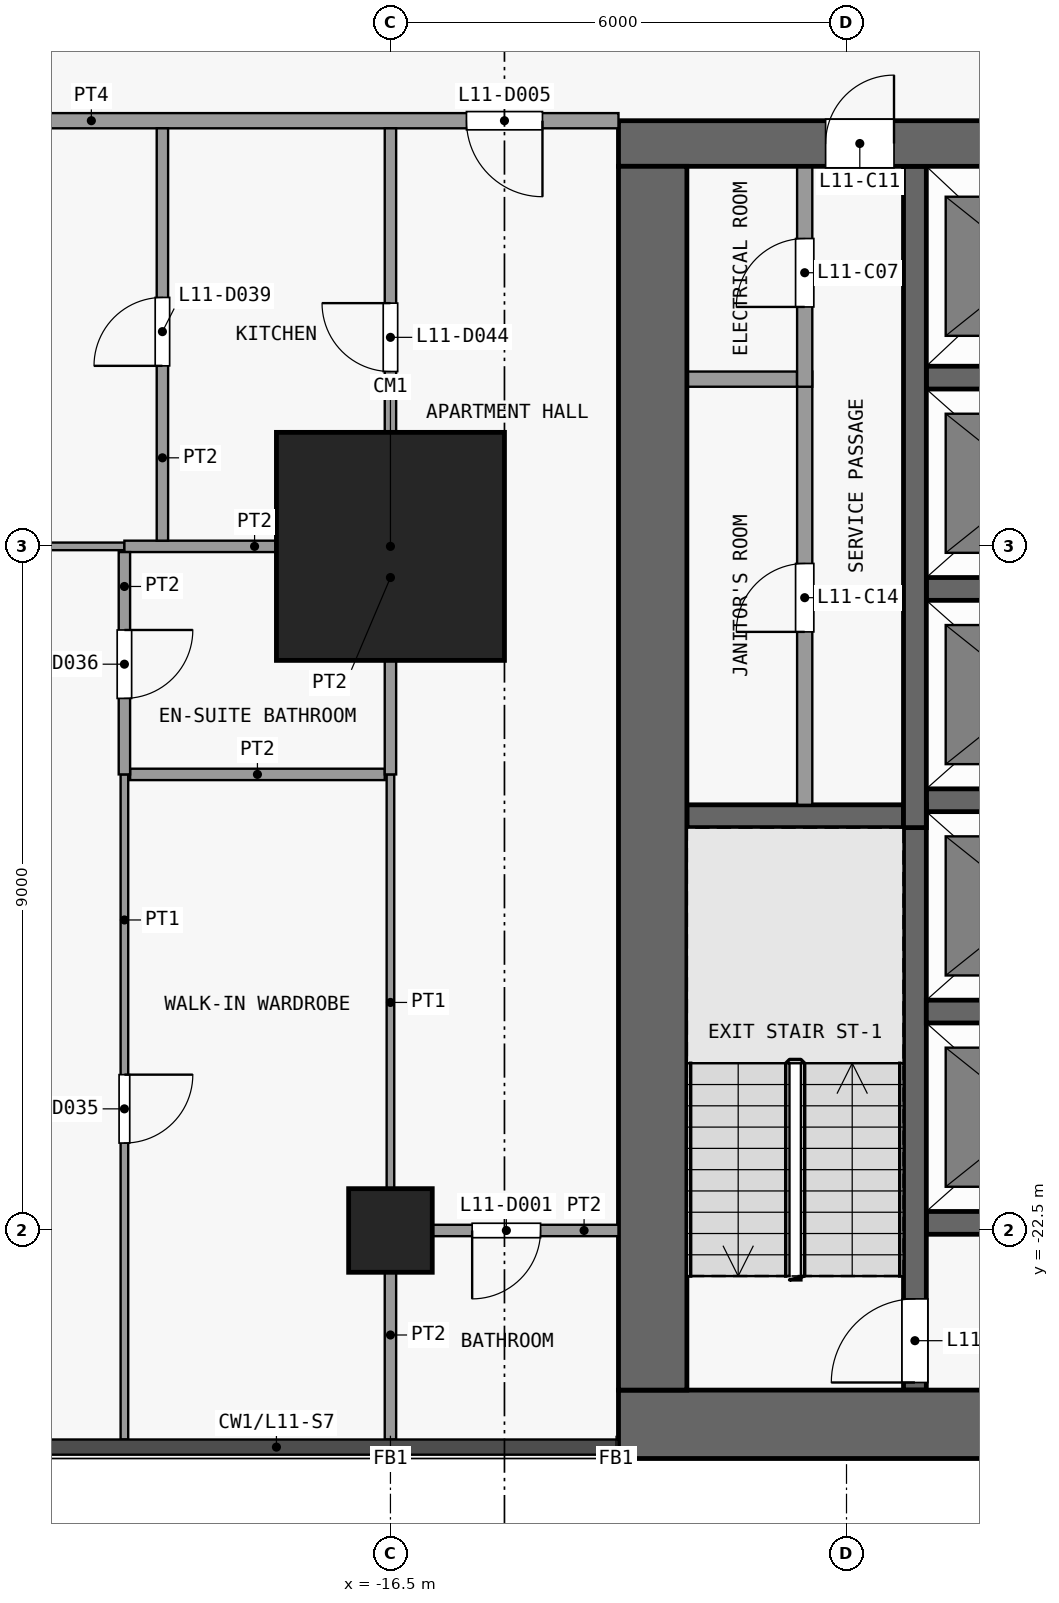
"""IFC4 building model, lengths in metres.
Left out: names, types, materials, properties, quantities, classifications, styles, units other than length and angle.
Written with IfcOpenShell. Run it as: python <this file> out.ifc"""

import sys

from ifc_helpers import new_model, si_unit, direction, frame, frame_2d, origin, origin_2d, place, context, subcontext, project, spatial, rectangle, extrude, element, fill, save


model = new_model("IFC4")
c1 = context("Model", 3, precision=1e-05, world=origin(), true_north=direction((0.0, 1.0)))
c2 = subcontext(c1, "Body", "Model", "MODEL_VIEW")
j1 = project(units=[si_unit("LENGTHUNIT", "METRE"), si_unit("PLANEANGLEUNIT", "RADIAN")], contexts=[c1])
p1 = place(None, origin())
s1 = spatial("IfcSite", under=j1, at=p1, CompositionType="ELEMENT")
p2 = place(p1, origin())
s2 = spatial("IfcBuilding", under=s1, at=p2, CompositionType="ELEMENT")
p3 = place(p2, frame((0.0, 0.0, 50.5)))
s3 = spatial("IfcBuildingStorey", under=s2, at=p3, CompositionType="ELEMENT", Elevation=50.5)
p4 = place(p3, frame((-16.5, -22.5, 0.0), z_axis=(0.0, 0.0, 1.0), x_axis=(1.0, 0.0, 0.0)))
e1 = element("IfcColumn", 1, at=p4, inside=s3, PredefinedType="COLUMN", context=c2, shape_type="SweptSolid", body=[
    extrude(rectangle(XDim=1.1, YDim=1.1, at=origin_2d()), origin(), (0.0, 0.0, 1.0), 3.6),
])
p5 = place(p3, frame((-16.5, -13.5, 0.0), z_axis=(0.0, 0.0, 1.0), x_axis=(1.0, 0.0, 0.0)))
e2 = element("IfcColumn", 2, at=p5, inside=s3, PredefinedType="COLUMN", context=c2, shape_type="SweptSolid", body=[
    extrude(rectangle(XDim=3.0, YDim=3.0, at=origin_2d()), origin(), (0.0, 0.0, 1.0), 3.6),
])
p6 = place(p3, frame((-13.5, -25.05, 0.0), z_axis=(0.0, 0.0, 1.0), x_axis=(1.0, 0.0, 0.0)))
e3 = element("IfcWall", 3, at=p6, inside=s3, PredefinedType="SHEAR", context=c2, shape_type="SweptSolid", body=[
    extrude(rectangle(XDim=27.0, YDim=0.9, at=frame_2d((13.5, 0.0))), origin(), (0.0, 0.0, 1.0), 3.3),
])
p7 = place(p3, frame((-13.5, -8.2, 0.0), z_axis=(0.0, 0.0, 1.0), x_axis=(1.0, 0.0, 0.0)))
e4 = element("IfcWall", 4, at=p7, inside=s3, PredefinedType="SHEAR", context=c2, shape_type="SweptSolid", body=[
    extrude(rectangle(XDim=27.0, YDim=0.6, at=frame_2d((13.5, 0.0))), origin(), (0.0, 0.0, 1.0), 3.3),
])
p8 = place(p7, frame((7.8, 0.0, 0.0)))
e5 = element("IfcOpeningElement", 5, at=p8, cuts=e4, PredefinedType="OPENING", context=c2, shape_type="SweptSolid", body=[
    extrude(rectangle(XDim=1.8, YDim=2.1, at=frame_2d((0.9, 1.05))), frame((0.0, 0.31, 0.0), z_axis=(0.0, -1.0, 0.0), x_axis=(1.0, 0.0, 0.0)), (0.0, 0.0, 1.0), 0.62),
])
p9 = place(p7, frame((17.4, 0.0, 0.0)))
e6 = element("IfcOpeningElement", 6, at=p9, cuts=e4, PredefinedType="OPENING", context=c2, shape_type="SweptSolid", body=[
    extrude(rectangle(XDim=1.8, YDim=2.1, at=frame_2d((0.9, 1.05))), frame((0.0, 0.31, 0.0), z_axis=(0.0, -1.0, 0.0), x_axis=(1.0, 0.0, 0.0)), (0.0, 0.0, 1.0), 0.62),
])
p10 = place(p7, frame((2.725, 0.0, 0.0)))
e7 = element("IfcOpeningElement", 7, at=p10, cuts=e4, PredefinedType="OPENING", context=c2, shape_type="SweptSolid", body=[
    extrude(rectangle(XDim=0.9, YDim=2.1, at=frame_2d((0.45, 1.05))), frame((0.0, 0.31, 0.0), z_axis=(0.0, -1.0, 0.0), x_axis=(1.0, 0.0, 0.0)), (0.0, 0.0, 1.0), 0.62),
])
p11 = place(p7, frame((23.375, 0.0, 0.0)))
e8 = element("IfcOpeningElement", 8, at=p11, cuts=e4, PredefinedType="OPENING", context=c2, shape_type="SweptSolid", body=[
    extrude(rectangle(XDim=0.9, YDim=2.1, at=frame_2d((0.45, 1.05))), frame((0.0, 0.31, 0.0), z_axis=(0.0, -1.0, 0.0), x_axis=(1.0, 0.0, 0.0)), (0.0, 0.0, 1.0), 0.62),
])
p12 = place(p3, frame((-13.05, -24.6, 0.0), z_axis=(0.0, 0.0, 1.0), x_axis=(0.0, 1.0, 0.0)))
e9 = element("IfcWall", 9, at=p12, inside=s3, PredefinedType="SHEAR", context=c2, shape_type="SweptSolid", body=[
    extrude(rectangle(XDim=16.1, YDim=0.9, at=frame_2d((8.05, 0.0))), origin(), (0.0, 0.0, 1.0), 3.3),
])
for number, where, z_axis, x_axis in (
    (10, (-9.45, -22.4, 0.0), (0.0, 0.0, 1.0), (1.0, 0.0, 0.0)),
    (11, (-9.45, -19.62, 0.0), (0.0, 0.0, 1.0), (1.0, 0.0, 0.0)),
):
    element("IfcWall", number, at=place(p3, frame(where, z_axis=z_axis, x_axis=x_axis)), inside=s3, PredefinedType="SHEAR", context=c2, shape_type="SweptSolid", body=[
        extrude(rectangle(XDim=2.8, YDim=0.3, at=frame_2d((1.4, 0.0))), origin(), (0.0, 0.0, 1.0), 3.3),
    ])
p13 = place(p3, frame((-12.6, -17.05, 0.0), z_axis=(0.0, 0.0, 1.0), x_axis=(1.0, 0.0, 0.0)))
e12 = element("IfcWall", 12, at=p13, inside=s3, PredefinedType="SHEAR", context=c2, shape_type="SweptSolid", body=[
    extrude(rectangle(XDim=2.85, YDim=0.3, at=frame_2d((1.425, 0.0))), origin(), (0.0, 0.0, 1.0), 3.3),
])
for number, where, z_axis, x_axis in (
    (13, (-9.45, -16.84, 0.0), (0.0, 0.0, 1.0), (1.0, 0.0, 0.0)),
    (14, (-9.45, -14.06, 0.0), (0.0, 0.0, 1.0), (1.0, 0.0, 0.0)),
):
    element("IfcWall", number, at=place(p3, frame(where, z_axis=z_axis, x_axis=x_axis)), inside=s3, PredefinedType="SHEAR", context=c2, shape_type="SweptSolid", body=[
        extrude(rectangle(XDim=2.8, YDim=0.3, at=frame_2d((1.4, 0.0))), origin(), (0.0, 0.0, 1.0), 3.3),
    ])
p14 = place(p3, frame((-12.6, -11.3, 0.0), z_axis=(0.0, 0.0, 1.0), x_axis=(1.0, 0.0, 0.0)))
e15 = element("IfcWall", 15, at=p14, inside=s3, PredefinedType="PARTITIONING", context=c2, shape_type="SweptSolid", body=[
    extrude(rectangle(XDim=1.45, YDim=0.2, at=frame_2d((0.725, 0.0))), origin(), (0.0, 0.0, 1.0), 3.3),
])
p15 = place(p3, frame((-9.45, -11.28, 0.0), z_axis=(0.0, 0.0, 1.0), x_axis=(1.0, 0.0, 0.0)))
e16 = element("IfcWall", 16, at=p15, inside=s3, PredefinedType="SHEAR", context=c2, shape_type="SweptSolid", body=[
    extrude(rectangle(XDim=2.8, YDim=0.3, at=frame_2d((1.4, 0.0))), origin(), (0.0, 0.0, 1.0), 3.3),
])
p16 = place(p3, frame((-11.05, -16.9, 0.0), z_axis=(0.0, 0.0, 1.0), x_axis=(0.0, 1.0, 0.0)))
e17 = element("IfcWall", 17, at=p16, inside=s3, PredefinedType="PARTITIONING", context=c2, shape_type="SweptSolid", body=[
    extrude(rectangle(XDim=5.7, YDim=0.2, at=frame_2d((2.85, 0.0))), origin(), (0.0, 0.0, 1.0), 3.3),
])
p17 = place(p16, frame((2.275, 0.0, 0.0)))
e18 = element("IfcOpeningElement", 18, at=p17, cuts=e17, PredefinedType="OPENING", context=c2, shape_type="SweptSolid", body=[
    extrude(rectangle(XDim=0.9, YDim=2.1, at=frame_2d((0.45, 1.05))), frame((0.0, 0.11, 0.0), z_axis=(0.0, -1.0, 0.0), x_axis=(1.0, 0.0, 0.0)), (0.0, 0.0, 1.0), 0.22),
])
p18 = place(p3, frame((-11.05, -11.4, 0.0), z_axis=(0.0, 0.0, 1.0), x_axis=(0.0, 1.0, 0.0)))
e19 = element("IfcWall", 19, at=p18, inside=s3, PredefinedType="PARTITIONING", context=c2, shape_type="SweptSolid", body=[
    extrude(rectangle(XDim=2.9, YDim=0.2, at=frame_2d((1.45, 0.0))), origin(), (0.0, 0.0, 1.0), 3.3),
])
p19 = place(p18, frame((1.05, 0.0, 0.0)))
e20 = element("IfcOpeningElement", 20, at=p19, cuts=e19, PredefinedType="OPENING", context=c2, shape_type="SweptSolid", body=[
    extrude(rectangle(XDim=0.9, YDim=2.1, at=frame_2d((0.45, 1.05))), frame((0.0, 0.11, 0.0), z_axis=(0.0, -1.0, 0.0), x_axis=(1.0, 0.0, 0.0)), (0.0, 0.0, 1.0), 0.22),
])
p20 = place(p3, frame((-9.6, -24.6, 0.0), z_axis=(0.0, 0.0, 1.0), x_axis=(0.0, 1.0, 0.0)))
e21 = element("IfcWall", 21, at=p20, inside=s3, PredefinedType="SHEAR", context=c2, shape_type="SweptSolid", body=[
    extrude(rectangle(XDim=7.7, YDim=0.3, at=frame_2d((3.85, 0.0))), origin(), (0.0, 0.0, 1.0), 3.3),
])
p21 = place(p20, frame((0.1, 0.0, 0.0)))
e22 = element("IfcOpeningElement", 22, at=p21, cuts=e21, PredefinedType="OPENING", context=c2, shape_type="SweptSolid", body=[
    extrude(rectangle(XDim=1.1, YDim=2.1, at=frame_2d((0.55, 1.05))), frame((0.0, 0.16, 0.0), z_axis=(0.0, -1.0, 0.0), x_axis=(1.0, 0.0, 0.0)), (0.0, 0.0, 1.0), 0.32),
])
p22 = place(p3, frame((-9.6, -17.2, 0.0), z_axis=(0.0, 0.0, 1.0), x_axis=(0.0, 1.0, 0.0)))
e23 = element("IfcWall", 23, at=p22, inside=s3, PredefinedType="SHEAR", context=c2, shape_type="SweptSolid", body=[
    extrude(rectangle(XDim=8.7, YDim=0.3, at=frame_2d((4.35, 0.0))), origin(), (0.0, 0.0, 1.0), 3.3),
])
p23 = place(p3, frame((-16.425, -22.5, 0.0), z_axis=(0.0, 0.0, 1.0), x_axis=(1.0, 0.0, 0.0)))
e24 = element("IfcWall", 24, at=p23, inside=s3, PredefinedType="PARTITIONING", context=c2, shape_type="SweptSolid", body=[
    extrude(rectangle(XDim=2.925, YDim=0.15, at=frame_2d((1.462, 0.0))), origin(), (0.0, 0.0, 1.0), 3.3),
])
p24 = place(p23, frame((1.0, 0.0, 0.0)))
e25 = element("IfcOpeningElement", 25, at=p24, cuts=e24, PredefinedType="OPENING", context=c2, shape_type="SweptSolid", body=[
    extrude(rectangle(XDim=0.9, YDim=2.1, at=frame_2d((0.45, 1.05))), frame((0.0, 0.085, 0.0), z_axis=(0.0, -1.0, 0.0), x_axis=(1.0, 0.0, 0.0)), (0.0, 0.0, 1.0), 0.17),
])
p25 = place(p3, frame((-19.925, -16.5, 0.0), z_axis=(0.0, 0.0, 1.0), x_axis=(1.0, 0.0, 0.0)))
e26 = element("IfcWall", 26, at=p25, inside=s3, PredefinedType="PARTITIONING", context=c2, shape_type="SweptSolid", body=[
    extrude(rectangle(XDim=3.35, YDim=0.15, at=frame_2d((1.675, 0.0))), origin(), (0.0, 0.0, 1.0), 3.3),
])
p26 = place(p3, frame((-25.25, -13.5, 0.0), z_axis=(0.0, 0.0, 1.0), x_axis=(1.0, 0.0, 0.0)))
e27 = element("IfcWall", 27, at=p26, inside=s3, PredefinedType="PARTITIONING", context=c2, shape_type="SweptSolid", body=[
    extrude(rectangle(XDim=5.25, YDim=0.1, at=frame_2d((2.625, 0.0))), origin(), (0.0, 0.0, 1.0), 3.3),
])
p27 = place(p26, frame((1.2, 0.0, 0.0)))
e28 = element("IfcOpeningElement", 28, at=p27, cuts=e27, PredefinedType="OPENING", context=c2, shape_type="SweptSolid", body=[
    extrude(rectangle(XDim=0.9, YDim=2.1, at=frame_2d((0.45, 1.05))), frame((0.0, 0.06, 0.0), z_axis=(0.0, -1.0, 0.0), x_axis=(1.0, 0.0, 0.0)), (0.0, 0.0, 1.0), 0.12),
])
p28 = place(p3, frame((-20.0, -13.5, 0.0), z_axis=(0.0, 0.0, 1.0), x_axis=(1.0, 0.0, 0.0)))
e29 = element("IfcWall", 29, at=p28, inside=s3, PredefinedType="PARTITIONING", context=c2, shape_type="SweptSolid", body=[
    extrude(rectangle(XDim=3.425, YDim=0.15, at=frame_2d((1.712, 0.0))), origin(), (0.0, 0.0, 1.0), 3.3),
])
p29 = place(p3, frame((-25.25, -7.9, 0.0), z_axis=(0.0, 0.0, 1.0), x_axis=(1.0, 0.0, 0.0)))
e30 = element("IfcWall", 30, at=p29, inside=s3, PredefinedType="PARTITIONING", context=c2, shape_type="SweptSolid", body=[
    extrude(rectangle(XDim=11.75, YDim=0.2, at=frame_2d((5.875, 0.0))), origin(), (0.0, 0.0, 1.0), 3.3),
])
p30 = place(p29, frame((9.75, 0.0, 0.0)))
e31 = element("IfcOpeningElement", 31, at=p30, cuts=e30, PredefinedType="OPENING", context=c2, shape_type="SweptSolid", body=[
    extrude(rectangle(XDim=1.0, YDim=2.1, at=frame_2d((0.5, 1.05))), frame((0.0, 0.11, 0.0), z_axis=(0.0, -1.0, 0.0), x_axis=(1.0, 0.0, 0.0)), (0.0, 0.0, 1.0), 0.22),
])
p31 = place(p3, frame((-20.0, -25.25, 0.0), z_axis=(0.0, 0.0, 1.0), x_axis=(0.0, 1.0, 0.0)))
e32 = element("IfcWall", 32, at=p31, inside=s3, PredefinedType="PARTITIONING", context=c2, shape_type="SweptSolid", body=[
    extrude(rectangle(XDim=8.75, YDim=0.1, at=frame_2d((4.375, 0.0))), origin(), (0.0, 0.0, 1.0), 3.3),
])
p32 = place(p31, frame((3.9, 0.0, 0.0)))
e33 = element("IfcOpeningElement", 33, at=p32, cuts=e32, PredefinedType="OPENING", context=c2, shape_type="SweptSolid", body=[
    extrude(rectangle(XDim=0.9, YDim=2.1, at=frame_2d((0.45, 1.05))), frame((0.0, 0.06, 0.0), z_axis=(0.0, -1.0, 0.0), x_axis=(1.0, 0.0, 0.0)), (0.0, 0.0, 1.0), 0.12),
])
p33 = place(p3, frame((-20.0, -16.5, 0.0), z_axis=(0.0, 0.0, 1.0), x_axis=(0.0, 1.0, 0.0)))
e34 = element("IfcWall", 34, at=p33, inside=s3, PredefinedType="PARTITIONING", context=c2, shape_type="SweptSolid", body=[
    extrude(rectangle(XDim=2.925, YDim=0.15, at=frame_2d((1.462, 0.0))), origin(), (0.0, 0.0, 1.0), 3.3),
])
p34 = place(p33, frame((1.0, 0.0, 0.0)))
e35 = element("IfcOpeningElement", 35, at=p34, cuts=e34, PredefinedType="OPENING", context=c2, shape_type="SweptSolid", body=[
    extrude(rectangle(XDim=0.9, YDim=2.1, at=frame_2d((0.45, 1.05))), frame((0.0, 0.085, 0.0), z_axis=(0.0, -1.0, 0.0), x_axis=(1.0, 0.0, 0.0)), (0.0, 0.0, 1.0), 0.17),
])
p35 = place(p3, frame((-19.5, -13.425, 0.0), z_axis=(0.0, 0.0, 1.0), x_axis=(0.0, 1.0, 0.0)))
e36 = element("IfcWall", 36, at=p35, inside=s3, PredefinedType="PARTITIONING", context=c2, shape_type="SweptSolid", body=[
    extrude(rectangle(XDim=5.425, YDim=0.15, at=frame_2d((2.712, 0.0))), origin(), (0.0, 0.0, 1.0), 3.3),
])
p36 = place(p35, frame((2.3, 0.0, 0.0)))
e37 = element("IfcOpeningElement", 37, at=p36, cuts=e36, PredefinedType="OPENING", context=c2, shape_type="SweptSolid", body=[
    extrude(rectangle(XDim=0.9, YDim=2.1, at=frame_2d((0.45, 1.05))), frame((0.0, 0.085, 0.0), z_axis=(0.0, -1.0, 0.0), x_axis=(1.0, 0.0, 0.0)), (0.0, 0.0, 1.0), 0.17),
])
p37 = place(p3, frame((-16.5, -22.5, 0.0), z_axis=(0.0, 0.0, 1.0), x_axis=(0.0, 1.0, 0.0)))
e38 = element("IfcWall", 38, at=p37, inside=s3, PredefinedType="PARTITIONING", context=c2, shape_type="SweptSolid", body=[
    extrude(rectangle(XDim=6.0, YDim=0.1, at=frame_2d((3.0, 0.0))), origin(), (0.0, 0.0, 1.0), 3.3),
])
p38 = place(p3, frame((-16.5, -25.25, 0.0), z_axis=(0.0, 0.0, 1.0), x_axis=(0.0, 1.0, 0.0)))
e39 = element("IfcWall", 39, at=p38, inside=s3, PredefinedType="PARTITIONING", context=c2, shape_type="SweptSolid", body=[
    extrude(rectangle(XDim=2.75, YDim=0.15, at=frame_2d((1.375, 0.0))), origin(), (0.0, 0.0, 1.0), 3.3),
])
p39 = place(p3, frame((-16.5, -16.5, 0.0), z_axis=(0.0, 0.0, 1.0), x_axis=(0.0, 1.0, 0.0)))
e40 = element("IfcWall", 40, at=p39, inside=s3, PredefinedType="PARTITIONING", context=c2, shape_type="SweptSolid", body=[
    extrude(rectangle(XDim=8.5, YDim=0.15, at=frame_2d((4.25, 0.0))), origin(), (0.0, 0.0, 1.0), 3.3),
])
p40 = place(p39, frame((5.3, 0.0, 0.0)))
e41 = element("IfcOpeningElement", 41, at=p40, cuts=e40, PredefinedType="OPENING", context=c2, shape_type="SweptSolid", body=[
    extrude(rectangle(XDim=0.9, YDim=2.1, at=frame_2d((0.45, 1.05))), frame((0.0, 0.085, 0.0), z_axis=(0.0, -1.0, 0.0), x_axis=(1.0, 0.0, 0.0)), (0.0, 0.0, 1.0), 0.17),
])
p41 = place(p19, origin())
e42 = element("IfcDoor", 42, at=p41, inside=s3, OperationType="SINGLE_SWING_LEFT", PredefinedType="DOOR", context=c2, shape_type="SweptSolid", body=[
    extrude(rectangle(XDim=0.9, YDim=2.1, at=frame_2d((0.45, 1.05))), frame((0.0, 0.025, 0.0), z_axis=(0.0, -1.0, 0.0), x_axis=(1.0, 0.0, 0.0)), (0.0, 0.0, 1.0), 0.05),
])
fill(e20, e42)
p42 = place(p10, origin())
e43 = element("IfcDoor", 43, at=p42, inside=s3, OperationType="SINGLE_SWING_RIGHT", PredefinedType="DOOR", context=c2, shape_type="SweptSolid", body=[
    extrude(rectangle(XDim=0.9, YDim=2.1, at=frame_2d((0.45, 1.05))), frame((0.0, 0.025, 0.0), z_axis=(0.0, -1.0, 0.0), x_axis=(1.0, 0.0, 0.0)), (0.0, 0.0, 1.0), 0.05),
])
fill(e7, e43)
p43 = place(p17, origin())
e44 = element("IfcDoor", 44, at=p43, inside=s3, OperationType="SINGLE_SWING_LEFT", PredefinedType="DOOR", context=c2, shape_type="SweptSolid", body=[
    extrude(rectangle(XDim=0.9, YDim=2.1, at=frame_2d((0.45, 1.05))), frame((0.0, 0.025, 0.0), z_axis=(0.0, -1.0, 0.0), x_axis=(1.0, 0.0, 0.0)), (0.0, 0.0, 1.0), 0.05),
])
fill(e18, e44)
p44 = place(p21, origin())
e45 = element("IfcDoor", 45, at=p44, inside=s3, OperationType="SINGLE_SWING_LEFT", PredefinedType="DOOR", context=c2, shape_type="SweptSolid", body=[
    extrude(rectangle(XDim=1.1, YDim=2.1, at=frame_2d((0.55, 1.05))), frame((0.0, 0.025, 0.0), z_axis=(0.0, -1.0, 0.0), x_axis=(1.0, 0.0, 0.0)), (0.0, 0.0, 1.0), 0.05),
])
fill(e22, e45)
p45 = place(p24, origin())
e46 = element("IfcDoor", 46, at=p45, inside=s3, OperationType="SINGLE_SWING_LEFT", PredefinedType="DOOR", context=c2, shape_type="SweptSolid", body=[
    extrude(rectangle(XDim=0.9, YDim=2.1, at=frame_2d((0.45, 1.05))), frame((0.0, 0.025, 0.0), z_axis=(0.0, -1.0, 0.0), x_axis=(1.0, 0.0, 0.0)), (0.0, 0.0, 1.0), 0.05),
])
fill(e25, e46)
p46 = place(p30, origin())
e47 = element("IfcDoor", 47, at=p46, inside=s3, OperationType="SINGLE_SWING_RIGHT", PredefinedType="DOOR", context=c2, shape_type="SweptSolid", body=[
    extrude(rectangle(XDim=1.0, YDim=2.1, at=frame_2d((0.5, 1.05))), frame((0.0, 0.025, 0.0), z_axis=(0.0, -1.0, 0.0), x_axis=(1.0, 0.0, 0.0)), (0.0, 0.0, 1.0), 0.05),
])
fill(e31, e47)
p47 = place(p32, origin())
e48 = element("IfcDoor", 48, at=p47, inside=s3, OperationType="SINGLE_SWING_RIGHT", PredefinedType="DOOR", context=c2, shape_type="SweptSolid", body=[
    extrude(rectangle(XDim=0.9, YDim=2.1, at=frame_2d((0.45, 1.05))), frame((0.0, 0.025, 0.0), z_axis=(0.0, -1.0, 0.0), x_axis=(1.0, 0.0, 0.0)), (0.0, 0.0, 1.0), 0.05),
])
fill(e33, e48)
p48 = place(p34, origin())
e49 = element("IfcDoor", 49, at=p48, inside=s3, OperationType="SINGLE_SWING_RIGHT", PredefinedType="DOOR", context=c2, shape_type="SweptSolid", body=[
    extrude(rectangle(XDim=0.9, YDim=2.1, at=frame_2d((0.45, 1.05))), frame((0.0, 0.025, 0.0), z_axis=(0.0, -1.0, 0.0), x_axis=(1.0, 0.0, 0.0)), (0.0, 0.0, 1.0), 0.05),
])
fill(e35, e49)
p49 = place(p36, origin())
e50 = element("IfcDoor", 50, at=p49, inside=s3, OperationType="SINGLE_SWING_RIGHT", PredefinedType="DOOR", context=c2, shape_type="SweptSolid", body=[
    extrude(rectangle(XDim=0.9, YDim=2.1, at=frame_2d((0.45, 1.05))), frame((0.0, 0.025, 0.0), z_axis=(0.0, -1.0, 0.0), x_axis=(1.0, 0.0, 0.0)), (0.0, 0.0, 1.0), 0.05),
])
fill(e37, e50)
p50 = place(p40, origin())
e51 = element("IfcDoor", 51, at=p50, inside=s3, OperationType="SINGLE_SWING_LEFT", PredefinedType="DOOR", context=c2, shape_type="SweptSolid", body=[
    extrude(rectangle(XDim=0.9, YDim=2.1, at=frame_2d((0.45, 1.05))), frame((0.0, 0.025, 0.0), z_axis=(0.0, -1.0, 0.0), x_axis=(1.0, 0.0, 0.0)), (0.0, 0.0, 1.0), 0.05),
])
fill(e41, e51)
save(model, sys.argv[1])
